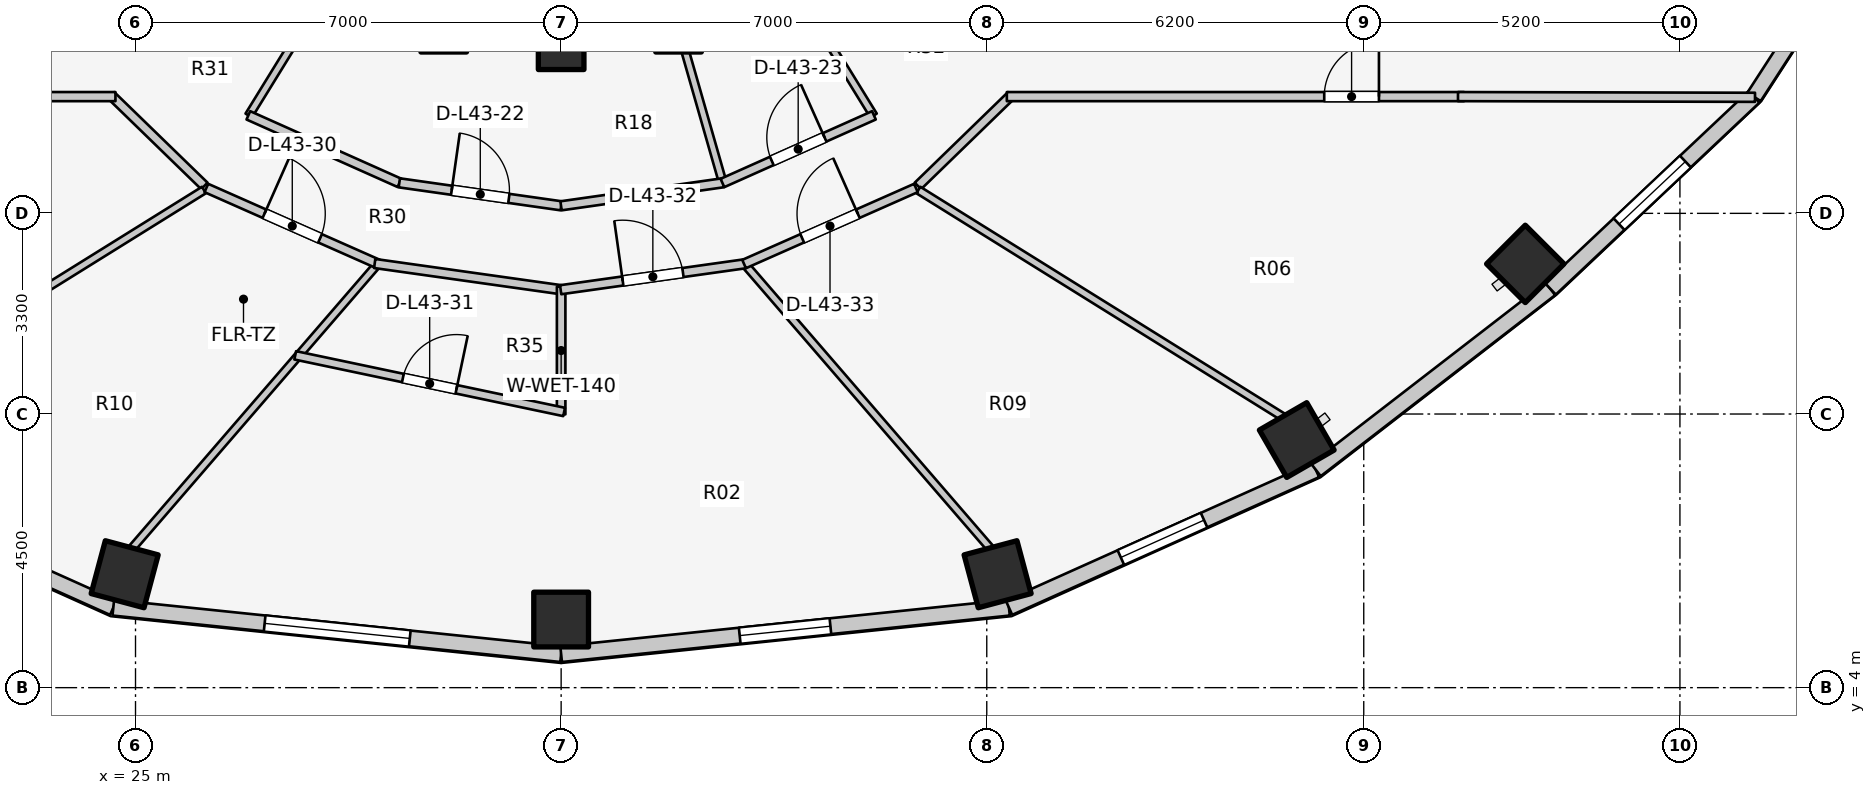
"""IFC4 building model, lengths in metres.
Left out: names, types, materials, properties, quantities, classifications, styles, units other than length and angle.
Written with IfcOpenShell. Run it as: python <this file> out.ifc"""

import sys

from ifc_helpers import new_model, si_unit, direction, frame, frame_2d, origin, origin_2d, place, context, subcontext, project, spatial, rectangle, extrude, element, fill, save


model = new_model("IFC4")
c1 = context("Model", 3, precision=1e-05, world=origin(), true_north=direction((0.0, 1.0)))
c2 = subcontext(c1, "Body", "Model", "MODEL_VIEW")
j1 = project(units=[si_unit("LENGTHUNIT", "METRE"), si_unit("PLANEANGLEUNIT", "RADIAN")], contexts=[c1])
p1 = place(None, origin())
s1 = spatial("IfcSite", under=j1, at=p1, CompositionType="ELEMENT")
p2 = place(p1, origin())
s2 = spatial("IfcBuilding", under=s1, at=p2, CompositionType="ELEMENT")
p3 = place(p2, frame((0.0, 0.0, 143.6)))
s3 = spatial("IfcBuildingStorey", under=s2, at=p3, CompositionType="ELEMENT", Elevation=143.6)
p4 = place(p3, frame((24.822, 5.865, 0.0), z_axis=(0.0, 0.0, 1.0), x_axis=(-0.258819045103, -0.965925826289, 0.0)))
e1 = element("IfcColumn", 1, at=p4, inside=s3, PredefinedType="COLUMN", context=c2, shape_type="SweptSolid", body=[
    extrude(rectangle(XDim=0.9, YDim=0.9, at=origin_2d()), origin(), (0.0, 0.0, 1.0), 3.1),
])
p5 = place(p3, frame((32.0, 14.54, 0.0), z_axis=(0.0, 0.0, 1.0), x_axis=(1.0, 0.0, 0.0)))
e2 = element("IfcColumn", 2, at=p5, inside=s3, PredefinedType="COLUMN", context=c2, shape_type="SweptSolid", body=[
    extrude(rectangle(XDim=0.75, YDim=0.75, at=origin_2d()), origin(), (0.0, 0.0, 1.0), 3.1),
])
for number, where, z_axis, x_axis in (
    (3, (32.0, 5.12, 0.0), (0.0, 0.0, 1.0), (0.0, -1.0, 0.0)),
    (4, (39.178, 5.865, 0.0), (0.0, 0.0, 1.0), (0.259, -0.966, 0.0)),
    (5, (44.098, 8.072, 0.0), (0.0, 0.0, 1.0), (0.5, -0.866, 0.0)),
    (6, (47.857, 10.969, 0.0), (0.0, 0.0, 1.0), (0.707, -0.707, 0.0)),
):
    element("IfcColumn", number, at=place(p3, frame(where, z_axis=z_axis, x_axis=x_axis)), inside=s3, PredefinedType="COLUMN", context=c2, shape_type="SweptSolid", body=[
        extrude(rectangle(XDim=0.9, YDim=0.9, at=origin_2d()), origin(), (0.0, 0.0, 1.0), 3.1),
    ])
p6 = place(p3, frame((19.587, 7.581, 0.0), z_axis=(0.0, 0.0, 1.0), x_axis=(0.912353637112, -0.409403029847, 0.0)))
e7 = element("IfcWall", 7, at=p6, inside=s3, PredefinedType="STANDARD", context=c2, shape_type="SweptSolid", body=[
    extrude(rectangle(XDim=5.533, YDim=0.26, at=frame_2d((2.766, 0.0))), origin(), (0.0, 0.0, 1.0), 2.85),
])
p7 = place(p6, frame((2.016, 0.0, 0.75)))
e8 = element("IfcOpeningElement", 8, at=p7, cuts=e7, PredefinedType="OPENING", context=c2, shape_type="SweptSolid", body=[
    extrude(rectangle(XDim=1.5, YDim=1.6, at=frame_2d((0.75, 0.8))), frame((0.0, 0.14, 0.0), z_axis=(0.0, -1.0, 0.0), x_axis=(1.0, 0.0, 0.0)), (0.0, 0.0, 1.0), 0.28),
])
p8 = place(p3, frame((24.635, 5.315, 0.0), z_axis=(0.0, 0.0, 1.0), x_axis=(0.994664178965, -0.10316574569, 0.0)))
e9 = element("IfcWall", 9, at=p8, inside=s3, PredefinedType="STANDARD", context=c2, shape_type="SweptSolid", body=[
    extrude(rectangle(XDim=7.405, YDim=0.26, at=frame_2d((3.702, 0.0))), origin(), (0.0, 0.0, 1.0), 2.85),
])
p9 = place(p8, frame((2.502, 0.0, 0.75)))
e10 = element("IfcOpeningElement", 10, at=p9, cuts=e9, PredefinedType="OPENING", context=c2, shape_type="SweptSolid", body=[
    extrude(rectangle(XDim=2.4, YDim=1.7, at=frame_2d((1.2, 0.85))), frame((0.0, 0.14, 0.0), z_axis=(0.0, -1.0, 0.0), x_axis=(1.0, 0.0, 0.0)), (0.0, 0.0, 1.0), 0.28),
])
p10 = place(p3, frame((32.0, 4.552, 0.0), z_axis=(0.0, 0.0, 1.0), x_axis=(0.994664178965, 0.10316574569, 0.0)))
e11 = element("IfcWall", 11, at=p10, inside=s3, PredefinedType="STANDARD", context=c2, shape_type="SweptSolid", body=[
    extrude(rectangle(XDim=7.405, YDim=0.26, at=frame_2d((3.702, 0.0))), origin(), (0.0, 0.0, 1.0), 2.85),
])
p11 = place(p10, frame((2.952, 0.0, 0.75)))
e12 = element("IfcOpeningElement", 12, at=p11, cuts=e11, PredefinedType="OPENING", context=c2, shape_type="SweptSolid", body=[
    extrude(rectangle(XDim=1.5, YDim=1.6, at=frame_2d((0.75, 0.8))), frame((0.0, 0.14, 0.0), z_axis=(0.0, -1.0, 0.0), x_axis=(1.0, 0.0, 0.0)), (0.0, 0.0, 1.0), 0.28),
])
p12 = place(p3, frame((39.365, 5.315, 0.0), z_axis=(0.0, 0.0, 1.0), x_axis=(0.912353637112, 0.409403029847, 0.0)))
e13 = element("IfcWall", 13, at=p12, inside=s3, PredefinedType="STANDARD", context=c2, shape_type="SweptSolid", body=[
    extrude(rectangle(XDim=5.533, YDim=0.26, at=frame_2d((2.766, 0.0))), origin(), (0.0, 0.0, 1.0), 2.85),
])
p13 = place(p12, frame((2.016, 0.0, 0.75)))
e14 = element("IfcOpeningElement", 14, at=p13, cuts=e13, PredefinedType="OPENING", context=c2, shape_type="SweptSolid", body=[
    extrude(rectangle(XDim=1.5, YDim=1.6, at=frame_2d((0.75, 0.8))), frame((0.0, 0.14, 0.0), z_axis=(0.0, -1.0, 0.0), x_axis=(1.0, 0.0, 0.0)), (0.0, 0.0, 1.0), 0.28),
])
p14 = place(p3, frame((44.413, 7.581, 0.0), z_axis=(0.0, 0.0, 1.0), x_axis=(0.791460185804, 0.611220724687, 0.0)))
e15 = element("IfcWall", 15, at=p14, inside=s3, PredefinedType="STANDARD", context=c2, shape_type="SweptSolid", body=[
    extrude(rectangle(XDim=4.872, YDim=0.26, at=frame_2d((2.436, 0.0))), origin(), (0.0, 0.0, 1.0), 2.85),
])
p15 = place(p3, frame((48.269, 10.559, 0.0), z_axis=(0.0, 0.0, 1.0), x_axis=(0.727667301037, 0.68593024354, 0.0)))
e16 = element("IfcWall", 16, at=p15, inside=s3, PredefinedType="STANDARD", context=c2, shape_type="SweptSolid", body=[
    extrude(rectangle(XDim=4.604, YDim=0.26, at=frame_2d((2.302, 0.0))), origin(), (0.0, 0.0, 1.0), 2.85),
])
p16 = place(p15, frame((1.552, 0.0, 0.75)))
e17 = element("IfcOpeningElement", 17, at=p16, cuts=e16, PredefinedType="OPENING", context=c2, shape_type="SweptSolid", body=[
    extrude(rectangle(XDim=1.5, YDim=1.6, at=frame_2d((0.75, 0.8))), frame((0.0, 0.14, 0.0), z_axis=(0.0, -1.0, 0.0), x_axis=(1.0, 0.0, 0.0)), (0.0, 0.0, 1.0), 0.28),
])
p17 = place(p3, frame((51.619, 13.716, 0.0), z_axis=(0.0, 0.0, 1.0), x_axis=(0.543358984534, 0.839500454989, 0.0)))
e18 = element("IfcWall", 18, at=p17, inside=s3, PredefinedType="STANDARD", context=c2, shape_type="SweptSolid", body=[
    extrude(rectangle(XDim=4.511, YDim=0.26, at=frame_2d((2.256, 0.0))), origin(), (0.0, 0.0, 1.0), 2.85),
])
p18 = place(p17, frame((1.506, 0.0, 0.75)))
e19 = element("IfcOpeningElement", 19, at=p18, cuts=e18, PredefinedType="OPENING", context=c2, shape_type="SweptSolid", body=[
    extrude(rectangle(XDim=1.5, YDim=1.6, at=frame_2d((0.75, 0.8))), frame((0.0, 0.14, 0.0), z_axis=(0.0, -1.0, 0.0), x_axis=(1.0, 0.0, 0.0)), (0.0, 0.0, 1.0), 0.28),
])
p19 = place(p3, frame((26.133, 12.251, 0.0), z_axis=(0.0, 0.0, 1.0), x_axis=(-0.717419568599, 0.696641344302, 0.0)))
e20 = element("IfcWall", 20, at=p19, inside=s3, PredefinedType="PARTITIONING", context=c2, shape_type="SweptSolid", body=[
    extrude(rectangle(XDim=2.138, YDim=0.15, at=frame_2d((1.069, 0.0))), origin(), (0.0, 0.0, 1.0), 2.299),
])
p20 = place(p3, frame((17.15, 13.72, 0.0), z_axis=(0.0, 0.0, 1.0), x_axis=(1.0, 0.0, 0.0)))
e21 = element("IfcWall", 21, at=p20, inside=s3, PredefinedType="PARTITIONING", context=c2, shape_type="SweptSolid", body=[
    extrude(rectangle(XDim=7.52, YDim=0.15, at=frame_2d((3.76, 0.0))), origin(), (0.0, 0.0, 1.0), 2.299),
])
p21 = place(p20, frame((1.3, 0.0, 0.0)))
e22 = element("IfcOpeningElement", 22, at=p21, cuts=e21, PredefinedType="OPENING", context=c2, shape_type="SweptSolid", body=[
    extrude(rectangle(XDim=0.9, YDim=2.1, at=frame_2d((0.45, 1.05))), frame((0.0, 0.085, 0.0), z_axis=(0.0, -1.0, 0.0), x_axis=(1.0, 0.0, 0.0)), (0.0, 0.0, 1.0), 0.17),
])
p22 = place(p3, frame((37.867, 12.251, 0.0), z_axis=(0.0, 0.0, 1.0), x_axis=(0.717419568599, 0.696641344302, 0.0)))
e23 = element("IfcWall", 23, at=p22, inside=s3, PredefinedType="PARTITIONING", context=c2, shape_type="SweptSolid", body=[
    extrude(rectangle(XDim=2.138, YDim=0.15, at=frame_2d((1.069, 0.0))), origin(), (0.0, 0.0, 1.0), 2.299),
])
p23 = place(p3, frame((39.33, 13.72, 0.0), z_axis=(0.0, 0.0, 1.0), x_axis=(1.0, 0.0, 0.0)))
e24 = element("IfcWall", 24, at=p23, inside=s3, PredefinedType="PARTITIONING", context=c2, shape_type="SweptSolid", body=[
    extrude(rectangle(XDim=7.52, YDim=0.15, at=frame_2d((3.76, 0.0))), origin(), (0.0, 0.0, 1.0), 2.299),
])
p24 = place(p23, frame((5.22, 0.0, 0.0)))
e25 = element("IfcOpeningElement", 25, at=p24, cuts=e24, PredefinedType="OPENING", context=c2, shape_type="SweptSolid", body=[
    extrude(rectangle(XDim=0.9, YDim=2.1, at=frame_2d((0.45, 1.05))), frame((0.0, 0.085, 0.0), z_axis=(0.0, -1.0, 0.0), x_axis=(1.0, 0.0, 0.0)), (0.0, 0.0, 1.0), 0.17),
])
p25 = place(p3, frame((46.75, 13.72, 0.0), z_axis=(0.0, 0.0, 1.0), x_axis=(0.999997122315, -0.00239903348, 0.0)))
e26 = element("IfcWall", 26, at=p25, inside=s3, PredefinedType="PARTITIONING", context=c2, shape_type="SweptSolid", body=[
    extrude(rectangle(XDim=4.885, YDim=0.15, at=frame_2d((2.442, 0.0))), origin(), (0.0, 0.0, 1.0), 2.22),
])
p26 = place(p3, frame((28.45, 15.985, 0.0), z_axis=(0.0, 0.0, 1.0), x_axis=(-0.524565340045, -0.851370192116, 0.0)))
e27 = element("IfcWall", 27, at=p26, inside=s3, PredefinedType="PARTITIONING", context=c2, shape_type="SweptSolid", body=[
    extrude(rectangle(XDim=3.027, YDim=0.125, at=frame_2d((1.514, 0.0))), origin(), (0.0, 0.0, 1.0), 2.299),
])
p27 = place(p3, frame((33.838, 15.176, 0.0), z_axis=(0.0, 0.0, 1.0), x_axis=(0.274947609893, -0.961459209647, 0.0)))
e28 = element("IfcWall", 28, at=p27, inside=s3, PredefinedType="PARTITIONING", context=c2, shape_type="SweptSolid", body=[
    extrude(rectangle(XDim=2.99, YDim=0.125, at=frame_2d((1.495, 0.0))), origin(), (0.0, 0.0, 1.0), 2.299),
])
p28 = place(p3, frame((35.55, 15.985, 0.0), z_axis=(0.0, 0.0, 1.0), x_axis=(0.524565340045, -0.851370192116, 0.0)))
e29 = element("IfcWall", 29, at=p28, inside=s3, PredefinedType="PARTITIONING", context=c2, shape_type="SweptSolid", body=[
    extrude(rectangle(XDim=3.027, YDim=0.125, at=frame_2d((1.514, 0.0))), origin(), (0.0, 0.0, 1.0), 2.299),
])
p29 = place(p3, frame((26.856, 13.412, 0.0), z_axis=(0.0, 0.0, 1.0), x_axis=(0.912985265053, -0.407992531545, 0.0)))
e30 = element("IfcWall", 30, at=p29, inside=s3, PredefinedType="PARTITIONING", context=c2, shape_type="SweptSolid", body=[
    extrude(rectangle(XDim=2.723, YDim=0.15, at=frame_2d((1.362, 0.0))), origin(), (0.0, 0.0, 1.0), 2.299),
])
p30 = place(p3, frame((29.339, 12.302, 0.0), z_axis=(0.0, 0.0, 1.0), x_axis=(0.990079774468, -0.140506370634, 0.0)))
e31 = element("IfcWall", 31, at=p30, inside=s3, PredefinedType="PARTITIONING", context=c2, shape_type="SweptSolid", body=[
    extrude(rectangle(XDim=2.69, YDim=0.15, at=frame_2d((1.345, 0.0))), origin(), (0.0, 0.0, 1.0), 2.299),
])
p31 = place(p30, frame((0.87, 0.0, 0.0)))
e32 = element("IfcOpeningElement", 32, at=p31, cuts=e31, PredefinedType="OPENING", context=c2, shape_type="SweptSolid", body=[
    extrude(rectangle(XDim=0.95, YDim=2.1, at=frame_2d((0.475, 1.05))), frame((0.0, 0.085, 0.0), z_axis=(0.0, -1.0, 0.0), x_axis=(1.0, 0.0, 0.0)), (0.0, 0.0, 1.0), 0.17),
])
p32 = place(p3, frame((31.998, 11.924, 0.0), z_axis=(0.0, 0.0, 1.0), x_axis=(0.990041682628, 0.140774524184, 0.0)))
e33 = element("IfcWall", 33, at=p32, inside=s3, PredefinedType="PARTITIONING", context=c2, shape_type="SweptSolid", body=[
    extrude(rectangle(XDim=2.695, YDim=0.15, at=frame_2d((1.348, 0.0))), origin(), (0.0, 0.0, 1.0), 2.299),
])
p33 = place(p3, frame((34.653, 12.299, 0.0), z_axis=(0.0, 0.0, 1.0), x_axis=(0.913112902883, 0.407706789971, 0.0)))
e34 = element("IfcWall", 34, at=p33, inside=s3, PredefinedType="PARTITIONING", context=c2, shape_type="SweptSolid", body=[
    extrude(rectangle(XDim=2.729, YDim=0.15, at=frame_2d((1.364, 0.0))), origin(), (0.0, 0.0, 1.0), 2.299),
])
p34 = place(p33, frame((0.889, 0.0, 0.0)))
e35 = element("IfcOpeningElement", 35, at=p34, cuts=e34, PredefinedType="OPENING", context=c2, shape_type="SweptSolid", body=[
    extrude(rectangle(XDim=0.95, YDim=2.1, at=frame_2d((0.475, 1.05))), frame((0.0, 0.085, 0.0), z_axis=(0.0, -1.0, 0.0), x_axis=(1.0, 0.0, 0.0)), (0.0, 0.0, 1.0), 0.17),
])
p35 = place(p3, frame((26.125, 12.184, 0.0), z_axis=(0.0, 0.0, 1.0), x_axis=(-0.849008457073, -0.528379257559, 0.0)))
e36 = element("IfcWall", 36, at=p35, inside=s3, PredefinedType="PARTITIONING", context=c2, shape_type="SweptSolid", body=[
    extrude(rectangle(XDim=7.077, YDim=0.125, at=frame_2d((3.539, 0.0))), origin(), (0.0, 0.0, 1.0), 2.299),
])
for number, where, z_axis, x_axis in (
    (37, (28.947, 10.927, 0.0), (0.0, 0.0, 1.0), (-0.654, -0.757, 0.0)),
    (38, (35.053, 10.927, 0.0), (0.0, 0.0, 1.0), (0.654, -0.757, 0.0)),
):
    element("IfcWall", number, at=place(p3, frame(where, z_axis=z_axis, x_axis=x_axis)), inside=s3, PredefinedType="PARTITIONING", context=c2, shape_type="SweptSolid", body=[
        extrude(rectangle(XDim=6.14, YDim=0.125, at=frame_2d((3.07, 0.0))), origin(), (0.0, 0.0, 1.0), 2.299),
    ])
p36 = place(p3, frame((37.875, 12.184, 0.0), z_axis=(0.0, 0.0, 1.0), x_axis=(0.849008457073, -0.528379257559, 0.0)))
e39 = element("IfcWall", 39, at=p36, inside=s3, PredefinedType="PARTITIONING", context=c2, shape_type="SweptSolid", body=[
    extrude(rectangle(XDim=7.077, YDim=0.125, at=frame_2d((3.539, 0.0))), origin(), (0.0, 0.0, 1.0), 2.299),
])
p37 = place(p3, frame((26.165, 12.217, 0.0), z_axis=(0.0, 0.0, 1.0), x_axis=(0.91445214467, -0.404694051239, 0.0)))
e40 = element("IfcWall", 40, at=p37, inside=s3, PredefinedType="PARTITIONING", context=c2, shape_type="SweptSolid", body=[
    extrude(rectangle(XDim=3.091, YDim=0.15, at=frame_2d((1.545, 0.0))), origin(), (0.0, 0.0, 1.0), 2.299),
])
p38 = place(p37, frame((1.045, 0.0, 0.0)))
e41 = element("IfcOpeningElement", 41, at=p38, cuts=e40, PredefinedType="OPENING", context=c2, shape_type="SweptSolid", body=[
    extrude(rectangle(XDim=1.0, YDim=2.1, at=frame_2d((0.5, 1.05))), frame((0.0, 0.085, 0.0), z_axis=(0.0, -1.0, 0.0), x_axis=(1.0, 0.0, 0.0)), (0.0, 0.0, 1.0), 0.17),
])
p39 = place(p3, frame((28.934, 10.975, 0.0), z_axis=(0.0, 0.0, 1.0), x_axis=(0.990254405439, -0.139270285808, 0.0)))
e42 = element("IfcWall", 42, at=p39, inside=s3, PredefinedType="PARTITIONING", context=c2, shape_type="SweptSolid", body=[
    extrude(rectangle(XDim=3.147, YDim=0.15, at=frame_2d((1.573, 0.0))), origin(), (0.0, 0.0, 1.0), 2.299),
])
p40 = place(p3, frame((32.0, 10.594, 0.0), z_axis=(0.0, 0.0, 1.0), x_axis=(0.0, -1.0, 0.0)))
e43 = element("IfcWall", 43, at=p40, inside=s3, PredefinedType="PLUMBINGWALL", context=c2, shape_type="SweptSolid", body=[
    extrude(rectangle(XDim=2.1, YDim=0.14, at=frame_2d((1.05, 0.0))), origin(), (0.0, 0.0, 1.0), 2.299),
])
p41 = place(p3, frame((27.627, 9.465, 0.0), z_axis=(0.0, 0.0, 1.0), x_axis=(0.97851996891, -0.206152056609, 0.0)))
e44 = element("IfcWall", 44, at=p41, inside=s3, PredefinedType="PLUMBINGWALL", context=c2, shape_type="SweptSolid", body=[
    extrude(rectangle(XDim=4.519, YDim=0.14, at=frame_2d((2.26, 0.0))), origin(), (0.0, 0.0, 1.0), 2.299),
])
p42 = place(p41, frame((1.81, 0.0, 0.0)))
e45 = element("IfcOpeningElement", 45, at=p42, cuts=e44, PredefinedType="OPENING", context=c2, shape_type="SweptSolid", body=[
    extrude(rectangle(XDim=0.9, YDim=2.1, at=frame_2d((0.45, 1.05))), frame((0.0, 0.08, 0.0), z_axis=(0.0, -1.0, 0.0), x_axis=(1.0, 0.0, 0.0)), (0.0, 0.0, 1.0), 0.16),
])
p43 = place(p3, frame((31.992, 10.544, 0.0), z_axis=(0.0, 0.0, 1.0), x_axis=(0.990243864279, 0.139345216129, 0.0)))
e46 = element("IfcWall", 46, at=p43, inside=s3, PredefinedType="PARTITIONING", context=c2, shape_type="SweptSolid", body=[
    extrude(rectangle(XDim=3.062, YDim=0.15, at=frame_2d((1.531, 0.0))), origin(), (0.0, 0.0, 1.0), 2.299),
])
p44 = place(p43, frame((1.031, 0.0, 0.0)))
e47 = element("IfcOpeningElement", 47, at=p44, cuts=e46, PredefinedType="OPENING", context=c2, shape_type="SweptSolid", body=[
    extrude(rectangle(XDim=1.0, YDim=2.1, at=frame_2d((0.5, 1.05))), frame((0.0, 0.085, 0.0), z_axis=(0.0, -1.0, 0.0), x_axis=(1.0, 0.0, 0.0)), (0.0, 0.0, 1.0), 0.17),
])
p45 = place(p3, frame((35.009, 10.966, 0.0), z_axis=(0.0, 0.0, 1.0), x_axis=(0.91445214467, 0.404694051239, 0.0)))
e48 = element("IfcWall", 48, at=p45, inside=s3, PredefinedType="PARTITIONING", context=c2, shape_type="SweptSolid", body=[
    extrude(rectangle(XDim=3.091, YDim=0.15, at=frame_2d((1.545, 0.0))), origin(), (0.0, 0.0, 1.0), 2.299),
])
p46 = place(p45, frame((1.045, 0.0, 0.0)))
e49 = element("IfcOpeningElement", 49, at=p46, cuts=e48, PredefinedType="OPENING", context=c2, shape_type="SweptSolid", body=[
    extrude(rectangle(XDim=1.0, YDim=2.1, at=frame_2d((0.5, 1.05))), frame((0.0, 0.085, 0.0), z_axis=(0.0, -1.0, 0.0), x_axis=(1.0, 0.0, 0.0)), (0.0, 0.0, 1.0), 0.17),
])
p47 = place(p9, origin())
e50 = element("IfcWindow", 50, at=p47, inside=s3, PartitioningType="SINGLE_PANEL", PredefinedType="WINDOW", context=c2, shape_type="SweptSolid", body=[
    extrude(rectangle(XDim=2.4, YDim=1.7, at=frame_2d((1.2, 0.85))), frame((0.0, 0.03, 0.0), z_axis=(0.0, -1.0, 0.0), x_axis=(1.0, 0.0, 0.0)), (0.0, 0.0, 1.0), 0.06),
])
fill(e10, e50)
p48 = place(p11, origin())
e51 = element("IfcWindow", 51, at=p48, inside=s3, PartitioningType="SINGLE_PANEL", PredefinedType="WINDOW", context=c2, shape_type="SweptSolid", body=[
    extrude(rectangle(XDim=1.5, YDim=1.6, at=frame_2d((0.75, 0.8))), frame((0.0, 0.03, 0.0), z_axis=(0.0, -1.0, 0.0), x_axis=(1.0, 0.0, 0.0)), (0.0, 0.0, 1.0), 0.06),
])
fill(e12, e51)
p49 = place(p13, origin())
e52 = element("IfcWindow", 52, at=p49, inside=s3, PartitioningType="SINGLE_PANEL", PredefinedType="WINDOW", context=c2, shape_type="SweptSolid", body=[
    extrude(rectangle(XDim=1.5, YDim=1.6, at=frame_2d((0.75, 0.8))), frame((0.0, 0.03, 0.0), z_axis=(0.0, -1.0, 0.0), x_axis=(1.0, 0.0, 0.0)), (0.0, 0.0, 1.0), 0.06),
])
fill(e14, e52)
p50 = place(p16, origin())
e53 = element("IfcWindow", 53, at=p50, inside=s3, PartitioningType="SINGLE_PANEL", PredefinedType="WINDOW", context=c2, shape_type="SweptSolid", body=[
    extrude(rectangle(XDim=1.5, YDim=1.6, at=frame_2d((0.75, 0.8))), frame((0.0, 0.03, 0.0), z_axis=(0.0, -1.0, 0.0), x_axis=(1.0, 0.0, 0.0)), (0.0, 0.0, 1.0), 0.06),
])
fill(e17, e53)
p51 = place(p24, origin())
e54 = element("IfcDoor", 54, at=p51, inside=s3, OperationType="SINGLE_SWING_RIGHT", PredefinedType="DOOR", context=c2, shape_type="SweptSolid", body=[
    extrude(rectangle(XDim=0.9, YDim=2.1, at=frame_2d((0.45, 1.05))), frame((0.0, 0.025, 0.0), z_axis=(0.0, -1.0, 0.0), x_axis=(1.0, 0.0, 0.0)), (0.0, 0.0, 1.0), 0.05),
])
fill(e25, e54)
p52 = place(p31, origin())
e55 = element("IfcDoor", 55, at=p52, inside=s3, OperationType="SINGLE_SWING_LEFT", PredefinedType="DOOR", context=c2, shape_type="SweptSolid", body=[
    extrude(rectangle(XDim=0.95, YDim=2.1, at=frame_2d((0.475, 1.05))), frame((0.0, 0.025, 0.0), z_axis=(0.0, -1.0, 0.0), x_axis=(1.0, 0.0, 0.0)), (0.0, 0.0, 1.0), 0.05),
])
fill(e32, e55)
p53 = place(p34, origin())
e56 = element("IfcDoor", 56, at=p53, inside=s3, OperationType="SINGLE_SWING_RIGHT", PredefinedType="DOOR", context=c2, shape_type="SweptSolid", body=[
    extrude(rectangle(XDim=0.95, YDim=2.1, at=frame_2d((0.475, 1.05))), frame((0.0, 0.025, 0.0), z_axis=(0.0, -1.0, 0.0), x_axis=(1.0, 0.0, 0.0)), (0.0, 0.0, 1.0), 0.05),
])
fill(e35, e56)
p54 = place(p38, origin())
e57 = element("IfcDoor", 57, at=p54, inside=s3, OperationType="SINGLE_SWING_LEFT", PredefinedType="DOOR", context=c2, shape_type="SweptSolid", body=[
    extrude(rectangle(XDim=1.0, YDim=2.1, at=frame_2d((0.5, 1.05))), frame((0.0, 0.025, 0.0), z_axis=(0.0, -1.0, 0.0), x_axis=(1.0, 0.0, 0.0)), (0.0, 0.0, 1.0), 0.05),
])
fill(e41, e57)
p55 = place(p42, origin())
e58 = element("IfcDoor", 58, at=p55, inside=s3, OperationType="SINGLE_SWING_RIGHT", PredefinedType="DOOR", context=c2, shape_type="SweptSolid", body=[
    extrude(rectangle(XDim=0.9, YDim=2.1, at=frame_2d((0.45, 1.05))), frame((0.0, 0.025, 0.0), z_axis=(0.0, -1.0, 0.0), x_axis=(1.0, 0.0, 0.0)), (0.0, 0.0, 1.0), 0.05),
])
fill(e45, e58)
p56 = place(p44, origin())
e59 = element("IfcDoor", 59, at=p56, inside=s3, OperationType="SINGLE_SWING_LEFT", PredefinedType="DOOR", context=c2, shape_type="SweptSolid", body=[
    extrude(rectangle(XDim=1.0, YDim=2.1, at=frame_2d((0.5, 1.05))), frame((0.0, 0.025, 0.0), z_axis=(0.0, -1.0, 0.0), x_axis=(1.0, 0.0, 0.0)), (0.0, 0.0, 1.0), 0.05),
])
fill(e47, e59)
p57 = place(p46, origin())
e60 = element("IfcDoor", 60, at=p57, inside=s3, OperationType="SINGLE_SWING_RIGHT", PredefinedType="DOOR", context=c2, shape_type="SweptSolid", body=[
    extrude(rectangle(XDim=1.0, YDim=2.1, at=frame_2d((0.5, 1.05))), frame((0.0, 0.025, 0.0), z_axis=(0.0, -1.0, 0.0), x_axis=(1.0, 0.0, 0.0)), (0.0, 0.0, 1.0), 0.05),
])
fill(e49, e60)
save(model, sys.argv[1])
